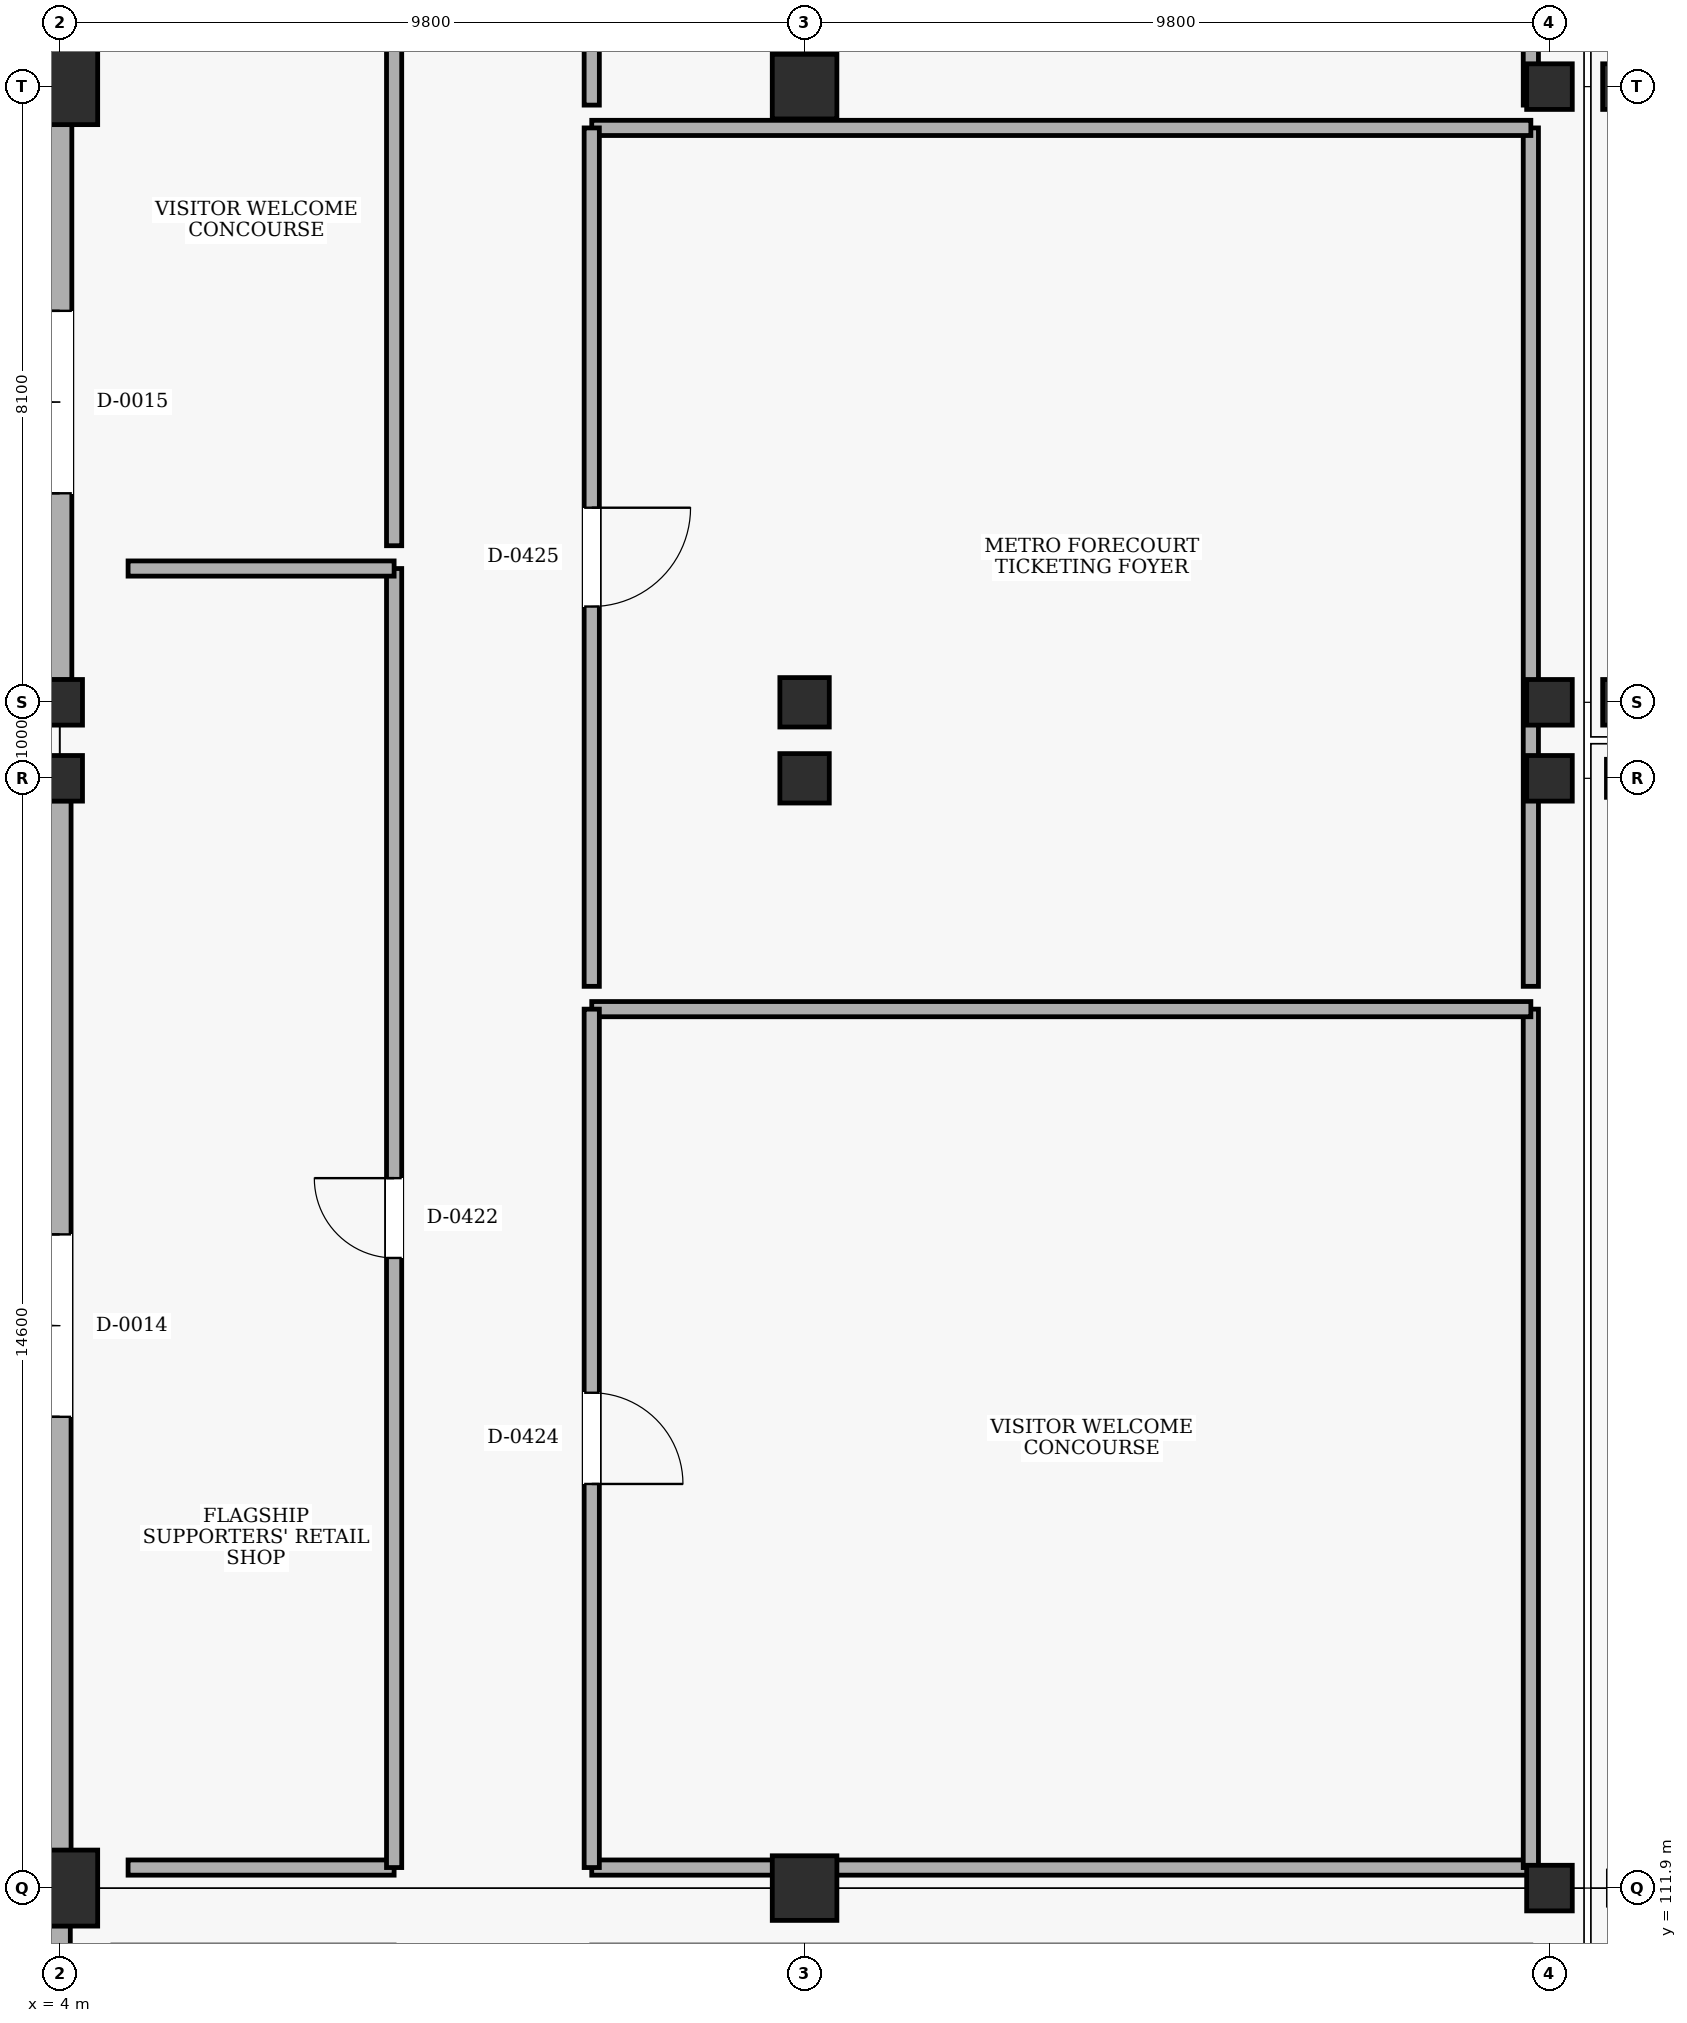
"""IFC4 building model, lengths in metres.
Left out: names, types, materials, properties, quantities, classifications, styles, units other than length and angle.
Written with IfcOpenShell. Run it as: python <this file> out.ifc"""

import sys

from ifc_helpers import new_model, si_unit, direction, frame, frame_2d, origin, origin_2d, place, context, subcontext, project, spatial, rectangle, extrude, element, fill, save


model = new_model("IFC4")
c1 = context("Model", 3, precision=1e-05, world=origin(), true_north=direction((0.0, 1.0)))
c2 = subcontext(c1, "Body", "Model", "MODEL_VIEW")
j1 = project(units=[si_unit("LENGTHUNIT", "METRE"), si_unit("PLANEANGLEUNIT", "RADIAN")], contexts=[c1])
p1 = place(None, origin())
s1 = spatial("IfcSite", under=j1, at=p1, CompositionType="ELEMENT")
p2 = place(p1, origin())
s2 = spatial("IfcBuilding", under=s1, at=p2, CompositionType="ELEMENT")
p3 = place(p2, origin())
s3 = spatial("IfcBuildingStorey", under=s2, at=p3, CompositionType="ELEMENT", Elevation=0.0)
p4 = place(p3, frame((4.0, 111.9, 0.0), z_axis=(0.0, 0.0, 1.0), x_axis=(1.0, 0.0, 0.0)))
e1 = element("IfcColumn", 1, at=p4, inside=s3, PredefinedType="COLUMN", context=c2, shape_type="SweptSolid", body=[
    extrude(rectangle(XDim=1.0, YDim=1.0, at=origin_2d()), origin(), (0.0, 0.0, 1.0), 5.4),
])
for number, where, z_axis, x_axis in (
    (2, (4.0, 126.5, 0.0), (0.0, 0.0, 1.0), (1.0, 0.0, 0.0)),
    (3, (4.0, 127.5, 0.0), (0.0, 0.0, 1.0), (1.0, 0.0, 0.0)),
):
    element("IfcColumn", number, at=place(p3, frame(where, z_axis=z_axis, x_axis=x_axis)), inside=s3, PredefinedType="COLUMN", context=c2, shape_type="SweptSolid", body=[
        extrude(rectangle(XDim=0.6, YDim=0.6, at=origin_2d()), origin(), (0.0, 0.0, 1.0), 5.4),
    ])
p5 = place(p3, frame((4.0, 135.6, 0.0), z_axis=(0.0, 0.0, 1.0), x_axis=(1.0, 0.0, 0.0)))
e4 = element("IfcColumn", 4, at=p5, inside=s3, PredefinedType="COLUMN", context=c2, shape_type="SweptSolid", body=[
    extrude(rectangle(XDim=1.0, YDim=1.0, at=origin_2d()), origin(), (0.0, 0.0, 1.0), 5.4),
])
p6 = place(p3, frame((13.8, 111.9, 0.0), z_axis=(0.0, 0.0, 1.0), x_axis=(1.0, 0.0, 0.0)))
e5 = element("IfcColumn", 5, at=p6, inside=s3, PredefinedType="COLUMN", context=c2, shape_type="SweptSolid", body=[
    extrude(rectangle(XDim=0.85, YDim=0.85, at=origin_2d()), origin(), (0.0, 0.0, 1.0), 5.4),
])
for number, where, z_axis, x_axis in (
    (6, (13.8, 126.5, 0.0), (0.0, 0.0, 1.0), (1.0, 0.0, 0.0)),
    (7, (13.8, 127.5, 0.0), (0.0, 0.0, 1.0), (1.0, 0.0, 0.0)),
):
    element("IfcColumn", number, at=place(p3, frame(where, z_axis=z_axis, x_axis=x_axis)), inside=s3, PredefinedType="COLUMN", context=c2, shape_type="SweptSolid", body=[
        extrude(rectangle(XDim=0.65, YDim=0.65, at=origin_2d()), origin(), (0.0, 0.0, 1.0), 5.4),
    ])
p7 = place(p3, frame((13.8, 135.6, 0.0), z_axis=(0.0, 0.0, 1.0), x_axis=(1.0, 0.0, 0.0)))
e8 = element("IfcColumn", 8, at=p7, inside=s3, PredefinedType="COLUMN", context=c2, shape_type="SweptSolid", body=[
    extrude(rectangle(XDim=0.85, YDim=0.85, at=origin_2d()), origin(), (0.0, 0.0, 1.0), 5.4),
])
for number, where, z_axis, x_axis in (
    (9, (23.6, 111.9, 0.0), (0.0, 0.0, 1.0), (1.0, 0.0, 0.0)),
    (10, (23.6, 126.5, 0.0), (0.0, 0.0, 1.0), (1.0, 0.0, 0.0)),
    (11, (23.6, 127.5, 0.0), (0.0, 0.0, 1.0), (1.0, 0.0, 0.0)),
    (12, (23.6, 135.6, 0.0), (0.0, 0.0, 1.0), (1.0, 0.0, 0.0)),
):
    element("IfcColumn", number, at=place(p3, frame(where, z_axis=z_axis, x_axis=x_axis)), inside=s3, PredefinedType="COLUMN", context=c2, shape_type="SweptSolid", body=[
        extrude(rectangle(XDim=0.6, YDim=0.6, at=origin_2d()), origin(), (0.0, 0.0, 1.0), 5.4),
    ])
p8 = place(p3, frame((24.6, 126.5, 0.0), z_axis=(0.0, 0.0, 1.0), x_axis=(1.0, 0.0, 0.0)))
e13 = element("IfcColumn", 13, at=p8, inside=s3, PredefinedType="COLUMN", context=c2, shape_type="SweptSolid", body=[
    extrude(rectangle(XDim=0.5, YDim=0.5, at=origin_2d()), origin(), (0.0, 0.0, 1.0), 5.4),
])
for number, where, z_axis, x_axis in (
    (14, (24.6, 127.5, 0.0), (0.0, 0.0, 1.0), (1.0, 0.0, 0.0)),
    (15, (24.6, 135.6, 0.0), (0.0, 0.0, 1.0), (1.0, 0.0, 0.0)),
):
    element("IfcColumn", number, at=place(p3, frame(where, z_axis=z_axis, x_axis=x_axis)), inside=s3, PredefinedType="COLUMN", context=c2, shape_type="SweptSolid", body=[
        extrude(rectangle(XDim=0.6, YDim=0.6, at=origin_2d()), origin(), (0.0, 0.0, 1.0), 5.4),
    ])
p9 = place(p3, frame((4.0, 105.195, 0.0), z_axis=(0.0, 0.0, 1.0), x_axis=(0.0, 1.0, 0.0)))
e16 = element("IfcWall", 16, at=p9, inside=s3, PredefinedType="SOLIDWALL", context=c2, shape_type="SweptSolid", body=[
    extrude(rectangle(XDim=6.21, YDim=0.28, at=frame_2d((3.105, 0.0))), origin(), (0.0, 0.0, 1.0), 4.26),
])
p10 = place(p9, frame((1.905, 0.0, 0.0)))
e17 = element("IfcOpeningElement", 17, at=p10, cuts=e16, PredefinedType="OPENING", context=c2, shape_type="SweptSolid", body=[
    extrude(rectangle(XDim=2.4, YDim=2.2, at=frame_2d((1.2, 1.1))), frame((0.0, 0.15, 0.0), z_axis=(0.0, -1.0, 0.0), x_axis=(1.0, 0.0, 0.0)), (0.0, 0.0, 1.0), 0.3),
])
p11 = place(p3, frame((4.0, 112.395, 0.0), z_axis=(0.0, 0.0, 1.0), x_axis=(0.0, 1.0, 0.0)))
e18 = element("IfcWall", 18, at=p11, inside=s3, PredefinedType="SOLIDWALL", context=c2, shape_type="SweptSolid", body=[
    extrude(rectangle(XDim=13.81, YDim=0.3, at=frame_2d((6.905, 0.0))), origin(), (0.0, 0.0, 1.0), 4.61),
])
p12 = place(p11, frame((5.705, 0.0, 0.0)))
e19 = element("IfcOpeningElement", 19, at=p12, cuts=e18, PredefinedType="OPENING", context=c2, shape_type="SweptSolid", body=[
    extrude(rectangle(XDim=2.4, YDim=2.2, at=frame_2d((1.2, 1.1))), frame((0.0, 0.16, 0.0), z_axis=(0.0, -1.0, 0.0), x_axis=(1.0, 0.0, 0.0)), (0.0, 0.0, 1.0), 0.32),
])
p13 = place(p3, frame((4.0, 127.795, 0.0), z_axis=(0.0, 0.0, 1.0), x_axis=(0.0, 1.0, 0.0)))
e20 = element("IfcWall", 20, at=p13, inside=s3, PredefinedType="SOLIDWALL", context=c2, shape_type="SweptSolid", body=[
    extrude(rectangle(XDim=7.31, YDim=0.32, at=frame_2d((3.655, 0.0))), origin(), (0.0, 0.0, 1.0), 4.26),
])
p14 = place(p13, frame((2.455, 0.0, 0.0)))
e21 = element("IfcOpeningElement", 21, at=p14, cuts=e20, PredefinedType="OPENING", context=c2, shape_type="SweptSolid", body=[
    extrude(rectangle(XDim=2.4, YDim=2.2, at=frame_2d((1.2, 1.1))), frame((0.0, 0.17, 0.0), z_axis=(0.0, -1.0, 0.0), x_axis=(1.0, 0.0, 0.0)), (0.0, 0.0, 1.0), 0.34),
])
p15 = place(p3, frame((4.9, 112.17, 0.0), z_axis=(0.0, 0.0, 1.0), x_axis=(1.0, 0.0, 0.0)))
e22 = element("IfcWall", 22, at=p15, inside=s3, PredefinedType="PARTITIONING", context=c2, shape_type="SweptSolid", body=[
    extrude(rectangle(XDim=3.5, YDim=0.2, at=frame_2d((1.75, 0.0))), origin(), (0.0, 0.0, 1.0), 4.21),
])
p16 = place(p3, frame((8.4, 112.17, 0.0), z_axis=(0.0, 0.0, 1.0), x_axis=(0.0, 1.0, 0.0)))
e23 = element("IfcWall", 23, at=p16, inside=s3, PredefinedType="PARTITIONING", context=c2, shape_type="SweptSolid", body=[
    extrude(rectangle(XDim=17.09, YDim=0.2, at=frame_2d((8.545, 0.0))), origin(), (0.0, 0.0, 1.0), 5.08),
])
p17 = place(p16, frame((8.02, 0.0, 0.0)))
e24 = element("IfcOpeningElement", 24, at=p17, cuts=e23, PredefinedType="OPENING", context=c2, shape_type="SweptSolid", body=[
    extrude(rectangle(XDim=1.05, YDim=2.15, at=frame_2d((0.525, 1.075))), frame((0.0, 0.11, 0.0), z_axis=(0.0, -1.0, 0.0), x_axis=(1.0, 0.0, 0.0)), (0.0, 0.0, 1.0), 0.22),
])
p18 = place(p3, frame((8.4, 129.26, 0.0), z_axis=(0.0, 0.0, 1.0), x_axis=(-1.0, 0.0, 0.0)))
e25 = element("IfcWall", 25, at=p18, inside=s3, PredefinedType="PARTITIONING", context=c2, shape_type="SweptSolid", body=[
    extrude(rectangle(XDim=3.5, YDim=0.2, at=frame_2d((1.75, 0.0))), origin(), (0.0, 0.0, 1.0), 5.08),
])
p19 = place(p3, frame((8.4, 129.56, 0.0), z_axis=(0.0, 0.0, 1.0), x_axis=(0.0, 1.0, 0.0)))
e26 = element("IfcWall", 26, at=p19, inside=s3, PredefinedType="PARTITIONING", context=c2, shape_type="SweptSolid", body=[
    extrude(rectangle(XDim=15.86, YDim=0.2, at=frame_2d((7.93, 0.0))), origin(), (0.0, 0.0, 1.0), 5.08),
])
p20 = place(p19, frame((7.37, 0.0, 0.0)))
e27 = element("IfcOpeningElement", 27, at=p20, cuts=e26, PredefinedType="OPENING", context=c2, shape_type="SweptSolid", body=[
    extrude(rectangle(XDim=1.12, YDim=2.15, at=frame_2d((0.56, 1.075))), frame((0.0, 0.11, 0.0), z_axis=(0.0, -1.0, 0.0), x_axis=(1.0, 0.0, 0.0)), (0.0, 0.0, 1.0), 0.22),
])
p21 = place(p3, frame((11.0, 112.17, 0.0), z_axis=(0.0, 0.0, 1.0), x_axis=(1.0, 0.0, 0.0)))
e28 = element("IfcWall", 28, at=p21, inside=s3, PredefinedType="PARTITIONING", context=c2, shape_type="SweptSolid", body=[
    extrude(rectangle(XDim=12.355, YDim=0.2, at=frame_2d((6.177, 0.0))), origin(), (0.0, 0.0, 1.0), 4.21),
])
p22 = place(p3, frame((23.355, 112.17, 0.0), z_axis=(0.0, 0.0, 1.0), x_axis=(0.0, 1.0, 0.0)))
e29 = element("IfcWall", 29, at=p22, inside=s3, PredefinedType="PARTITIONING", context=c2, shape_type="SweptSolid", body=[
    extrude(rectangle(XDim=11.293, YDim=0.2, at=frame_2d((5.647, 0.0))), origin(), (0.0, 0.0, 1.0), 4.61),
])
p23 = place(p3, frame((23.355, 123.463, 0.0), z_axis=(0.0, 0.0, 1.0), x_axis=(-1.0, 0.0, 0.0)))
e30 = element("IfcWall", 30, at=p23, inside=s3, PredefinedType="PARTITIONING", context=c2, shape_type="SweptSolid", body=[
    extrude(rectangle(XDim=12.355, YDim=0.2, at=frame_2d((6.177, 0.0))), origin(), (0.0, 0.0, 1.0), 5.08),
])
p24 = place(p3, frame((11.0, 123.463, 0.0), z_axis=(0.0, 0.0, 1.0), x_axis=(0.0, -1.0, 0.0)))
e31 = element("IfcWall", 31, at=p24, inside=s3, PredefinedType="PARTITIONING", context=c2, shape_type="SweptSolid", body=[
    extrude(rectangle(XDim=11.293, YDim=0.2, at=frame_2d((5.647, 0.0))), origin(), (0.0, 0.0, 1.0), 5.08),
])
p25 = place(p24, frame((5.047, 0.0, 0.0)))
e32 = element("IfcOpeningElement", 32, at=p25, cuts=e31, PredefinedType="OPENING", context=c2, shape_type="SweptSolid", body=[
    extrude(rectangle(XDim=1.2, YDim=2.15, at=frame_2d((0.6, 1.075))), frame((0.0, 0.11, 0.0), z_axis=(0.0, -1.0, 0.0), x_axis=(1.0, 0.0, 0.0)), (0.0, 0.0, 1.0), 0.22),
])
p26 = place(p3, frame((23.355, 123.763, 0.0), z_axis=(0.0, 0.0, 1.0), x_axis=(0.0, 1.0, 0.0)))
e33 = element("IfcWall", 33, at=p26, inside=s3, PredefinedType="PARTITIONING", context=c2, shape_type="SweptSolid", body=[
    extrude(rectangle(XDim=11.293, YDim=0.2, at=frame_2d((5.647, 0.0))), origin(), (0.0, 0.0, 1.0), 4.31),
])
p27 = place(p3, frame((23.355, 135.057, 0.0), z_axis=(0.0, 0.0, 1.0), x_axis=(-1.0, 0.0, 0.0)))
e34 = element("IfcWall", 34, at=p27, inside=s3, PredefinedType="PARTITIONING", context=c2, shape_type="SweptSolid", body=[
    extrude(rectangle(XDim=12.355, YDim=0.2, at=frame_2d((6.177, 0.0))), origin(), (0.0, 0.0, 1.0), 5.08),
])
p28 = place(p3, frame((11.0, 135.057, 0.0), z_axis=(0.0, 0.0, 1.0), x_axis=(0.0, -1.0, 0.0)))
e35 = element("IfcWall", 35, at=p28, inside=s3, PredefinedType="PARTITIONING", context=c2, shape_type="SweptSolid", body=[
    extrude(rectangle(XDim=11.293, YDim=0.2, at=frame_2d((5.647, 0.0))), origin(), (0.0, 0.0, 1.0), 5.08),
])
p29 = place(p28, frame((4.997, 0.0, 0.0)))
e36 = element("IfcOpeningElement", 36, at=p29, cuts=e35, PredefinedType="OPENING", context=c2, shape_type="SweptSolid", body=[
    extrude(rectangle(XDim=1.3, YDim=2.2, at=frame_2d((0.65, 1.1))), frame((0.0, 0.11, 0.0), z_axis=(0.0, -1.0, 0.0), x_axis=(1.0, 0.0, 0.0)), (0.0, 0.0, 1.0), 0.22),
])
p30 = place(p3, frame((23.355, 135.357, 0.0), z_axis=(0.0, 0.0, 1.0), x_axis=(0.0, 1.0, 0.0)))
e37 = element("IfcWall", 37, at=p30, inside=s3, PredefinedType="PARTITIONING", context=c2, shape_type="SweptSolid", body=[
    extrude(rectangle(XDim=11.293, YDim=0.2, at=frame_2d((5.646, 0.0))), origin(), (0.0, 0.0, 1.0), 4.31),
])
p31 = place(p3, frame((11.0, 146.65, 0.0), z_axis=(0.0, 0.0, 1.0), x_axis=(0.0, -1.0, 0.0)))
e38 = element("IfcWall", 38, at=p31, inside=s3, PredefinedType="PARTITIONING", context=c2, shape_type="SweptSolid", body=[
    extrude(rectangle(XDim=11.293, YDim=0.2, at=frame_2d((5.646, 0.0))), origin(), (0.0, 0.0, 1.0), 5.08),
])
p32 = place(p31, frame((4.947, 0.0, 0.0)))
e39 = element("IfcOpeningElement", 39, at=p32, cuts=e38, PredefinedType="OPENING", context=c2, shape_type="SweptSolid", body=[
    extrude(rectangle(XDim=1.4, YDim=2.2, at=frame_2d((0.7, 1.1))), frame((0.0, 0.11, 0.0), z_axis=(0.0, -1.0, 0.0), x_axis=(1.0, 0.0, 0.0)), (0.0, 0.0, 1.0), 0.22),
])
p33 = place(p12, origin())
e40 = element("IfcDoor", 40, at=p33, inside=s3, OperationType="DOUBLE_DOOR_SINGLE_SWING", PredefinedType="DOOR", context=c2, shape_type="SweptSolid", body=[
    extrude(rectangle(XDim=2.4, YDim=2.2, at=frame_2d((1.2, 1.1))), frame((0.0, 0.025, 0.0), z_axis=(0.0, -1.0, 0.0), x_axis=(1.0, 0.0, 0.0)), (0.0, 0.0, 1.0), 0.05),
])
fill(e19, e40)
p34 = place(p14, origin())
e41 = element("IfcDoor", 41, at=p34, inside=s3, OperationType="DOUBLE_DOOR_SINGLE_SWING", PredefinedType="DOOR", context=c2, shape_type="SweptSolid", body=[
    extrude(rectangle(XDim=2.4, YDim=2.2, at=frame_2d((1.2, 1.1))), frame((0.0, 0.025, 0.0), z_axis=(0.0, -1.0, 0.0), x_axis=(1.0, 0.0, 0.0)), (0.0, 0.0, 1.0), 0.05),
])
fill(e21, e41)
p35 = place(p17, origin())
e42 = element("IfcDoor", 42, at=p35, inside=s3, OperationType="SINGLE_SWING_RIGHT", PredefinedType="DOOR", context=c2, shape_type="SweptSolid", body=[
    extrude(rectangle(XDim=1.05, YDim=2.15, at=frame_2d((0.525, 1.075))), frame((0.0, 0.025, 0.0), z_axis=(0.0, -1.0, 0.0), x_axis=(1.0, 0.0, 0.0)), (0.0, 0.0, 1.0), 0.05),
])
fill(e24, e42)
p36 = place(p25, origin())
e43 = element("IfcDoor", 43, at=p36, inside=s3, OperationType="SINGLE_SWING_RIGHT", PredefinedType="DOOR", context=c2, shape_type="SweptSolid", body=[
    extrude(rectangle(XDim=1.2, YDim=2.15, at=frame_2d((0.6, 1.075))), frame((0.0, 0.025, 0.0), z_axis=(0.0, -1.0, 0.0), x_axis=(1.0, 0.0, 0.0)), (0.0, 0.0, 1.0), 0.05),
])
fill(e32, e43)
p37 = place(p29, origin())
e44 = element("IfcDoor", 44, at=p37, inside=s3, OperationType="SINGLE_SWING_LEFT", PredefinedType="DOOR", context=c2, shape_type="SweptSolid", body=[
    extrude(rectangle(XDim=1.3, YDim=2.2, at=frame_2d((0.65, 1.1))), frame((0.0, 0.025, 0.0), z_axis=(0.0, -1.0, 0.0), x_axis=(1.0, 0.0, 0.0)), (0.0, 0.0, 1.0), 0.05),
])
fill(e36, e44)
save(model, sys.argv[1])
